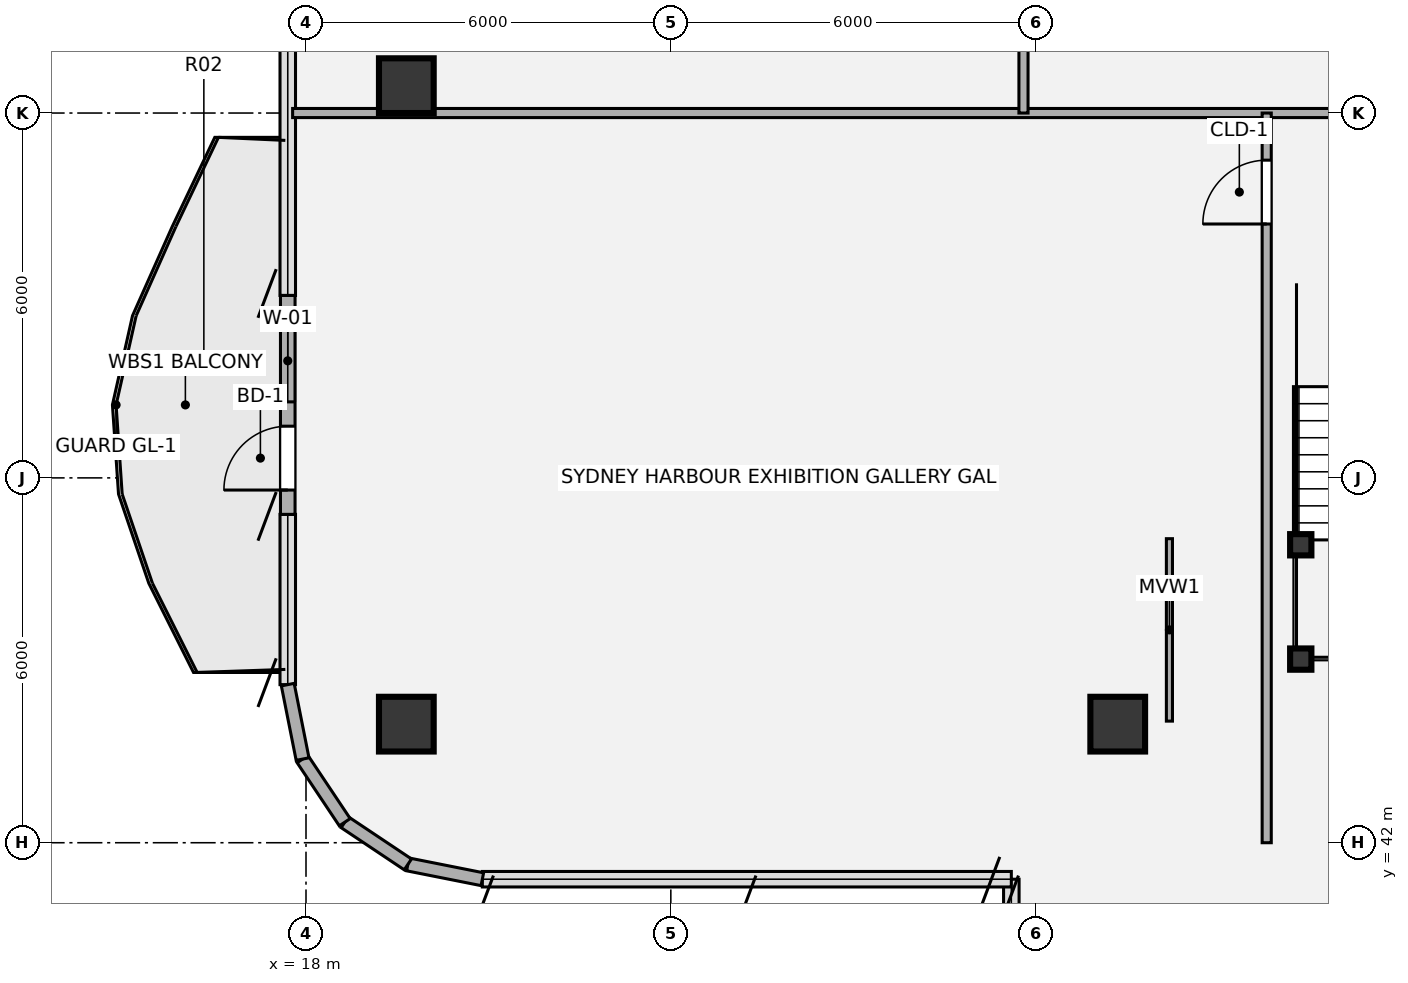
"""IFC4 building model, lengths in metres.
Left out: names, types, materials, properties, quantities, classifications, styles, units other than length and angle.
Written with IfcOpenShell. Run it as: python <this file> out.ifc"""

import sys

from ifc_helpers import new_model, si_unit, direction, frame, frame_2d, origin, origin_2d, place, context, subcontext, project, spatial, rectangle, hollow_rectangle, hollow_circle, extrude, source, transform, mapped, element, fill, save


model = new_model("IFC4")
c1 = context("Model", 3, precision=1e-05, world=origin(), true_north=direction((0.0, 1.0)))
c2 = subcontext(c1, "Body", "Model", "MODEL_VIEW")
j1 = project(units=[si_unit("LENGTHUNIT", "METRE"), si_unit("PLANEANGLEUNIT", "RADIAN")], contexts=[c1])
p1 = place(None, origin())
s1 = spatial("IfcSite", under=j1, at=p1, CompositionType="ELEMENT")
p2 = place(p1, origin())
s2 = spatial("IfcBuilding", under=s1, at=p2, CompositionType="ELEMENT")
p3 = place(p2, frame((0.0, 0.0, 287.28)))
s3 = spatial("IfcBuildingStorey", under=s2, at=p3, CompositionType="ELEMENT", Elevation=287.28)
m1 = source(origin(), c2, "Body", "SweptSolid", [
    extrude(hollow_circle(Radius=0.45, WallThickness=0.032, at=origin_2d()), origin(), (0.0, 0.0, 1.0), 3.78),
])
for number, where, z_axis, x_axis in (
    (1, (19.65, 43.95, 0.0), (0.0, 0.0, 1.0), (1.0, 0.0, 0.0)),
    (2, (19.65, 54.45, 0.0), (0.0, 0.0, 1.0), (1.0, 0.0, 0.0)),
    (3, (31.35, 43.95, 0.0), (0.0, 0.0, 1.0), (1.0, 0.0, 0.0)),
):
    element("IfcColumn", number, at=place(p3, frame(where, z_axis=z_axis, x_axis=x_axis)), inside=s3, PredefinedType="COLUMN", context=c2, shape_type="MappedRepresentation", body=[
        mapped(m1, transform((0.0, 0.0, 0.0), x_axis=(1.0, 0.0, 0.0), y_axis=(0.0, 1.0, 0.0), z_axis=(0.0, 0.0, 1.0), scale=1.0)),
    ])
m2 = source(origin(), c2, "Body", "SweptSolid", [
    extrude(hollow_rectangle(XDim=0.35, YDim=0.35, WallThickness=0.016, OuterFilletRadius=0.032, at=origin_2d()), origin(), (0.0, 0.0, 1.0), 1.69),
])
for number, where, z_axis, x_axis in (
    (4, (34.36, 45.02, 0.0), (0.0, 0.0, 1.0), (1.0, 0.0, 0.0)),
    (5, (34.36, 46.9, 0.0), (0.0, 0.0, 1.0), (1.0, 0.0, 0.0)),
):
    element("IfcColumn", number, at=place(p3, frame(where, z_axis=z_axis, x_axis=x_axis)), inside=s3, PredefinedType="COLUMN", context=c2, shape_type="MappedRepresentation", body=[
        mapped(m2, transform((0.0, 0.0, 0.0), x_axis=(1.0, 0.0, 0.0), y_axis=(0.0, 1.0, 0.0), z_axis=(0.0, 0.0, 1.0), scale=1.0)),
    ])
for number, where, z_axis, x_axis in (
    (6, (20.9, 41.4, 0.0), (0.0, 0.0, 1.0), (-0.981, 0.195, 0.0)),
    (7, (19.675, 41.644, 0.0), (0.0, 0.0, 1.0), (-0.831, 0.556, 0.0)),
    (8, (18.637, 42.337, 0.0), (0.0, 0.0, 1.0), (-0.556, 0.831, 0.0)),
    (9, (17.944, 43.375, 0.0), (0.0, 0.0, 1.0), (-0.195, 0.981, 0.0)),
):
    element("IfcWall", number, at=place(p3, frame(where, z_axis=z_axis, x_axis=x_axis)), inside=s3, PredefinedType="SOLIDWALL", context=c2, shape_type="SweptSolid", body=[
        extrude(rectangle(XDim=1.249, YDim=0.215, at=frame_2d((0.624, 0.0))), origin(), (0.0, 0.0, 1.0), 3.46),
    ])
p4 = place(p3, frame((17.7, 47.4, 0.0), z_axis=(0.0, 0.0, 1.0), x_axis=(0.0, 1.0, 0.0)))
e10 = element("IfcWall", 10, at=p4, inside=s3, PredefinedType="SOLIDWALL", context=c2, shape_type="SweptSolid", body=[
    extrude(rectangle(XDim=3.6, YDim=0.24, at=frame_2d((1.8, 0.0))), origin(), (0.0, 0.0, 1.0), 3.46),
])
p5 = place(p4, frame((0.4, 0.0, 0.0)))
e11 = element("IfcOpeningElement", 11, at=p5, cuts=e10, PredefinedType="OPENING", context=c2, shape_type="SweptSolid", body=[
    extrude(rectangle(XDim=1.05, YDim=2.15, at=origin_2d()), frame((0.525, 0.13, 1.075), z_axis=(0.0, -1.0, 0.0), x_axis=(1.0, 0.0, 0.0)), (0.0, 0.0, 1.0), 0.26),
])
p6 = place(p4, frame((1.85, 0.0, 0.85)))
e12 = element("IfcOpeningElement", 12, at=p6, cuts=e10, PredefinedType="OPENING", context=c2, shape_type="SweptSolid", body=[
    extrude(rectangle(XDim=1.35, YDim=1.35, at=origin_2d()), frame((0.675, 0.13, 0.675), z_axis=(0.0, -1.0, 0.0), x_axis=(1.0, 0.0, 0.0)), (0.0, 0.0, 1.0), 0.26),
])
p7 = place(p3, frame((17.78, 54.0, 0.0), z_axis=(0.0, 0.0, 1.0), x_axis=(1.0, 0.0, 0.0)))
e13 = element("IfcWall", 13, at=p7, inside=s3, PredefinedType="PARTITIONING", context=c2, shape_type="SweptSolid", body=[
    extrude(rectangle(XDim=36.44, YDim=0.15, at=frame_2d((18.22, 0.0))), origin(), (0.0, 0.0, 1.0), 2.985),
])
p8 = place(p7, frame((17.695, 0.0, 0.0)))
e14 = element("IfcOpeningElement", 14, at=p8, cuts=e13, PredefinedType="OPENING", context=c2, shape_type="SweptSolid", body=[
    extrude(rectangle(XDim=1.05, YDim=2.1, at=origin_2d()), frame((0.525, 0.085, 1.05), z_axis=(0.0, -1.0, 0.0), x_axis=(1.0, 0.0, 0.0)), (0.0, 0.0, 1.0), 0.17),
])
p9 = place(p3, frame((29.8, 54.0, 0.0), z_axis=(0.0, 0.0, 1.0), x_axis=(0.0, 1.0, 0.0)))
e15 = element("IfcWall", 15, at=p9, inside=s3, PredefinedType="PARTITIONING", context=c2, shape_type="SweptSolid", body=[
    extrude(rectangle(XDim=6.954, YDim=0.15, at=frame_2d((3.477, 0.0))), origin(), (0.0, 0.0, 1.0), 3.43),
])
p10 = place(p3, frame((33.8, 42.0, 0.0), z_axis=(0.0, 0.0, 1.0), x_axis=(0.0, 1.0, 0.0)))
e16 = element("IfcWall", 16, at=p10, inside=s3, PredefinedType="PARTITIONING", context=c2, shape_type="SweptSolid", body=[
    extrude(rectangle(XDim=12.0, YDim=0.15, at=frame_2d((6.0, 0.0))), origin(), (0.0, 0.0, 1.0), 3.43),
])
p11 = place(p10, frame((10.175, 0.0, 0.0)))
e17 = element("IfcOpeningElement", 17, at=p11, cuts=e16, PredefinedType="OPENING", context=c2, shape_type="SweptSolid", body=[
    extrude(rectangle(XDim=1.05, YDim=2.1, at=origin_2d()), frame((0.525, 0.085, 1.05), z_axis=(0.0, -1.0, 0.0), x_axis=(1.0, 0.0, 0.0)), (0.0, 0.0, 1.0), 0.17),
])
p12 = place(p3, frame((32.2, 44.0, 0.0), z_axis=(0.0, 0.0, 1.0), x_axis=(0.0, 1.0, 0.0)))
e18 = element("IfcWall", 18, at=p12, inside=s3, PredefinedType="MOVABLE", context=c2, shape_type="SweptSolid", body=[
    extrude(rectangle(XDim=3.0, YDim=0.1, at=frame_2d((1.5, 0.0))), origin(), (0.0, 0.0, 1.0), 2.85),
])
m3 = source(origin(), c2, "Body", "SweptSolid", [
    extrude(rectangle(XDim=1.05, YDim=2.15, at=origin_2d()), frame((0.525, 0.025, 1.075), z_axis=(0.0, -1.0, 0.0), x_axis=(1.0, 0.0, 0.0)), (0.0, 0.0, 1.0), 0.05),
])
p13 = place(p5, origin())
e19 = element("IfcDoor", 19, at=p13, inside=s3, OperationType="SINGLE_SWING_LEFT", PredefinedType="DOOR", context=c2, shape_type="MappedRepresentation", body=[
    mapped(m3, transform((0.0, 0.0, 0.0), x_axis=(1.0, 0.0, 0.0), y_axis=(0.0, 1.0, 0.0), z_axis=(0.0, 0.0, 1.0), scale=1.0)),
])
fill(e11, e19)
m4 = source(origin(), c2, "Body", "SweptSolid", [
    extrude(rectangle(XDim=1.35, YDim=1.35, at=origin_2d()), frame((0.675, 0.03, 0.675), z_axis=(0.0, -1.0, 0.0), x_axis=(1.0, 0.0, 0.0)), (0.0, 0.0, 1.0), 0.06),
])
p14 = place(p6, origin())
e20 = element("IfcWindow", 20, at=p14, inside=s3, PartitioningType="SINGLE_PANEL", PredefinedType="WINDOW", context=c2, shape_type="MappedRepresentation", body=[
    mapped(m4, transform((0.0, 0.0, 0.0), x_axis=(1.0, 0.0, 0.0), y_axis=(0.0, 1.0, 0.0), z_axis=(0.0, 0.0, 1.0), scale=1.0)),
])
fill(e12, e20)
m5 = source(origin(), c2, "Body", "SweptSolid", [
    extrude(rectangle(XDim=1.05, YDim=2.1, at=origin_2d()), frame((0.525, 0.025, 1.05), z_axis=(0.0, -1.0, 0.0), x_axis=(1.0, 0.0, 0.0)), (0.0, 0.0, 1.0), 0.05),
])
p15 = place(p11, origin())
e21 = element("IfcDoor", 21, at=p15, inside=s3, OperationType="SINGLE_SWING_LEFT", PredefinedType="DOOR", context=c2, shape_type="MappedRepresentation", body=[
    mapped(m5, transform((0.0, 0.0, 0.0), x_axis=(1.0, 0.0, 0.0), y_axis=(0.0, 1.0, 0.0), z_axis=(0.0, 0.0, 1.0), scale=1.0)),
])
fill(e17, e21)
save(model, sys.argv[1])
